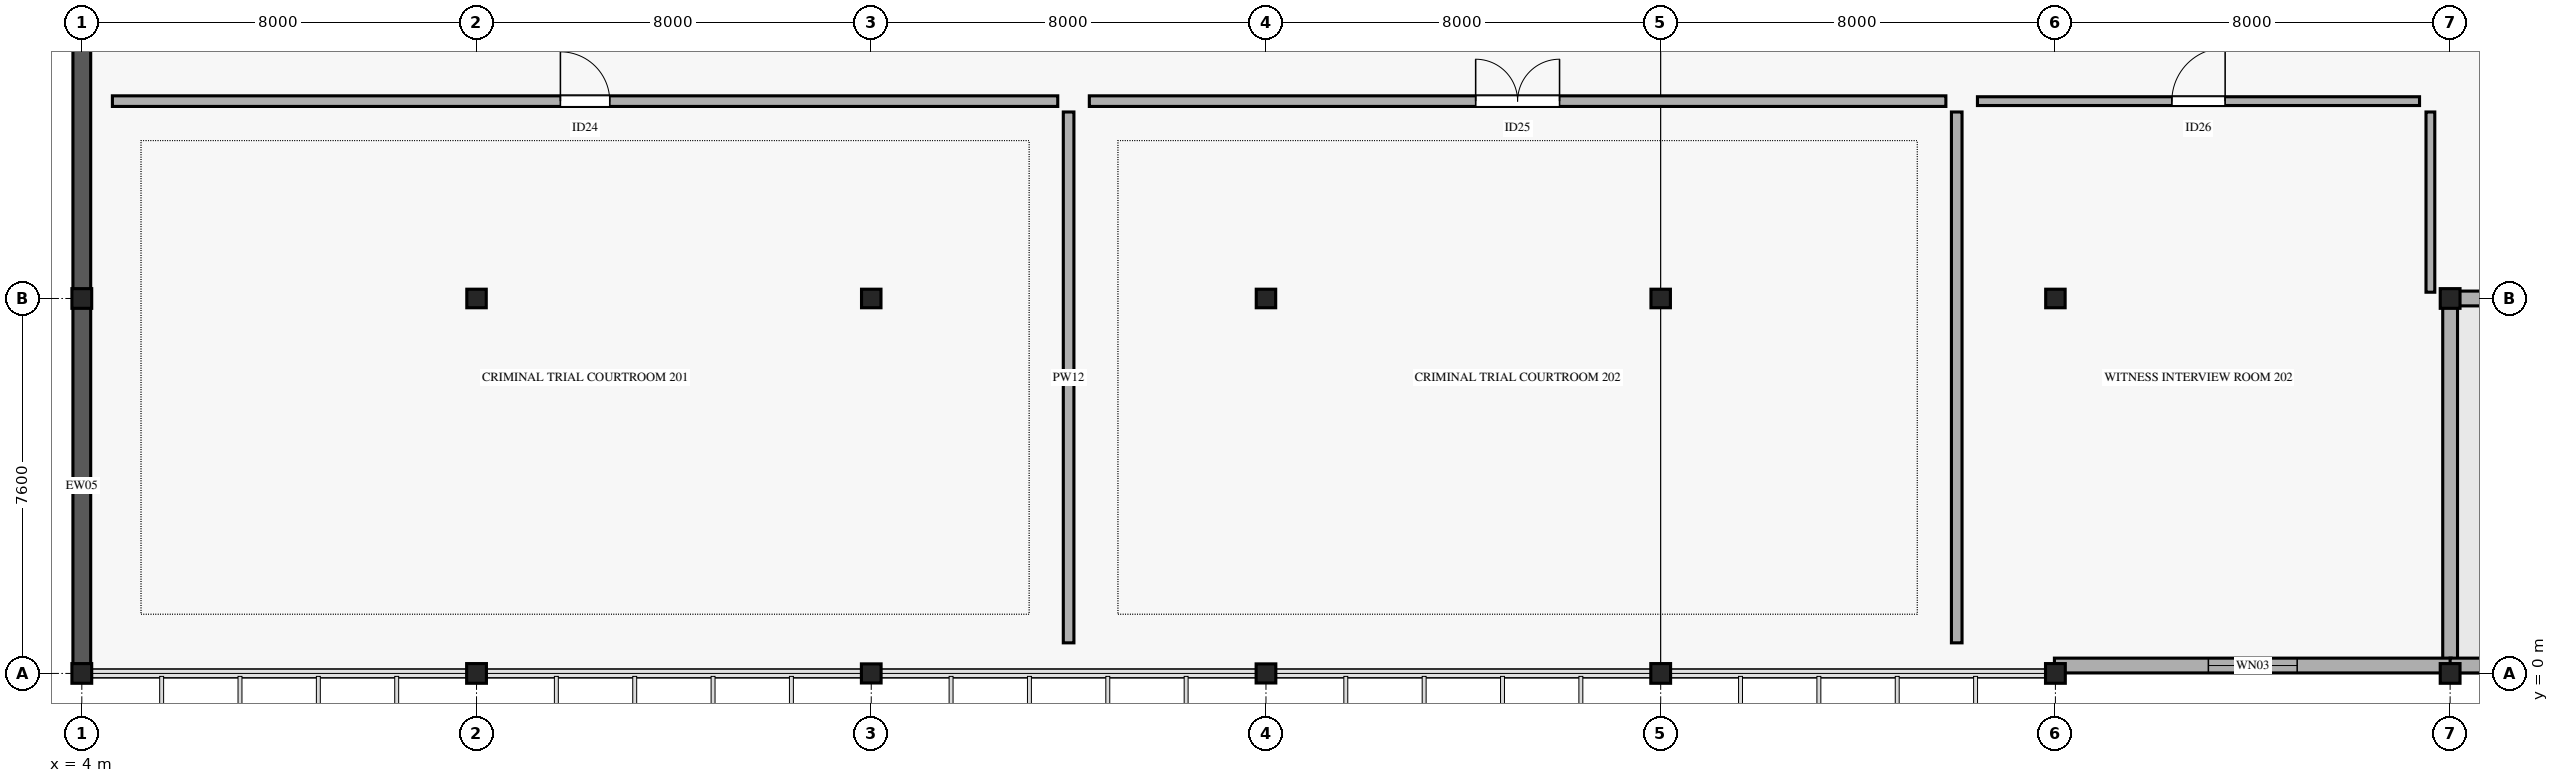
"""IFC4 building model, lengths in metres.
Left out: names, types, materials, properties, quantities, classifications, styles, units other than length and angle.
Written with IfcOpenShell. Run it as: python <this file> out.ifc"""

import sys

from ifc_helpers import new_model, si_unit, direction, frame, frame_2d, origin, origin_2d, place, context, subcontext, project, spatial, rectangle, i_section, extrude, element, fill, save


model = new_model("IFC4")
c1 = context("Model", 3, precision=1e-05, world=origin(), true_north=direction((0.0, 1.0)))
c2 = subcontext(c1, "Body", "Model", "MODEL_VIEW")
j1 = project(units=[si_unit("LENGTHUNIT", "METRE"), si_unit("PLANEANGLEUNIT", "RADIAN")], contexts=[c1])
p1 = place(None, origin())
s1 = spatial("IfcSite", under=j1, at=p1, CompositionType="ELEMENT")
p2 = place(p1, origin())
s2 = spatial("IfcBuilding", under=s1, at=p2, CompositionType="ELEMENT")
p3 = place(p2, frame((0.0, 0.0, 10.8)))
s3 = spatial("IfcBuildingStorey", under=s2, at=p3, CompositionType="ELEMENT", Elevation=10.8)
for number, where, z_axis, x_axis in (
    (1, (4.0, 0.0, 0.0), (0.0, 0.0, 1.0), (1.0, 0.0, 0.0)),
    (2, (4.0, 7.6, 0.0), (0.0, 0.0, 1.0), (1.0, 0.0, 0.0)),
    (3, (12.0, 0.0, 0.0), (0.0, 0.0, 1.0), (1.0, 0.0, 0.0)),
):
    element("IfcColumn", number, at=place(p3, frame(where, z_axis=z_axis, x_axis=x_axis)), inside=s3, PredefinedType="COLUMN", context=c2, shape_type="SweptSolid", body=[
        extrude(i_section(OverallWidth=0.401, OverallDepth=0.399, WebThickness=0.025, FlangeThickness=0.04, FilletRadius=0.015, at=origin_2d()), origin(), (0.0, 0.0, 1.0), 4.59),
    ])
p4 = place(p3, frame((12.0, 7.6, 0.0), z_axis=(0.0, 0.0, 1.0), x_axis=(1.0, 0.0, 0.0)))
e4 = element("IfcColumn", 4, at=p4, inside=s3, PredefinedType="COLUMN", context=c2, shape_type="SweptSolid", body=[
    extrude(i_section(OverallWidth=0.394, OverallDepth=0.376, WebThickness=0.017, FlangeThickness=0.028, FilletRadius=0.015, at=origin_2d()), origin(), (0.0, 0.0, 1.0), 4.59),
])
p5 = place(p3, frame((20.0, 0.0, 0.0), z_axis=(0.0, 0.0, 1.0), x_axis=(1.0, 0.0, 0.0)))
e5 = element("IfcColumn", 5, at=p5, inside=s3, PredefinedType="COLUMN", context=c2, shape_type="SweptSolid", body=[
    extrude(i_section(OverallWidth=0.399, OverallDepth=0.387, WebThickness=0.021, FlangeThickness=0.033, FilletRadius=0.015, at=origin_2d()), origin(), (0.0, 0.0, 1.0), 4.59),
])
p6 = place(p3, frame((20.0, 7.6, 0.0), z_axis=(0.0, 0.0, 1.0), x_axis=(1.0, 0.0, 0.0)))
e6 = element("IfcColumn", 6, at=p6, inside=s3, PredefinedType="COLUMN", context=c2, shape_type="SweptSolid", body=[
    extrude(i_section(OverallWidth=0.394, OverallDepth=0.376, WebThickness=0.017, FlangeThickness=0.028, FilletRadius=0.015, at=origin_2d()), origin(), (0.0, 0.0, 1.0), 4.59),
])
p7 = place(p3, frame((28.0, 0.0, 0.0), z_axis=(0.0, 0.0, 1.0), x_axis=(1.0, 0.0, 0.0)))
e7 = element("IfcColumn", 7, at=p7, inside=s3, PredefinedType="COLUMN", context=c2, shape_type="SweptSolid", body=[
    extrude(i_section(OverallWidth=0.399, OverallDepth=0.387, WebThickness=0.021, FlangeThickness=0.033, FilletRadius=0.015, at=origin_2d()), origin(), (0.0, 0.0, 1.0), 4.59),
])
p8 = place(p3, frame((28.0, 7.6, 0.0), z_axis=(0.0, 0.0, 1.0), x_axis=(1.0, 0.0, 0.0)))
e8 = element("IfcColumn", 8, at=p8, inside=s3, PredefinedType="COLUMN", context=c2, shape_type="SweptSolid", body=[
    extrude(i_section(OverallWidth=0.394, OverallDepth=0.376, WebThickness=0.017, FlangeThickness=0.028, FilletRadius=0.015, at=origin_2d()), origin(), (0.0, 0.0, 1.0), 4.59),
])
p9 = place(p3, frame((36.0, 0.0, 0.0), z_axis=(0.0, 0.0, 1.0), x_axis=(1.0, 0.0, 0.0)))
e9 = element("IfcColumn", 9, at=p9, inside=s3, PredefinedType="COLUMN", context=c2, shape_type="SweptSolid", body=[
    extrude(i_section(OverallWidth=0.401, OverallDepth=0.399, WebThickness=0.025, FlangeThickness=0.04, FilletRadius=0.015, at=origin_2d()), origin(), (0.0, 0.0, 1.0), 4.59),
])
p10 = place(p3, frame((36.0, 7.6, 0.0), z_axis=(0.0, 0.0, 1.0), x_axis=(1.0, 0.0, 0.0)))
e10 = element("IfcColumn", 10, at=p10, inside=s3, PredefinedType="COLUMN", context=c2, shape_type="SweptSolid", body=[
    extrude(i_section(OverallWidth=0.394, OverallDepth=0.376, WebThickness=0.017, FlangeThickness=0.028, FilletRadius=0.015, at=origin_2d()), origin(), (0.0, 0.0, 1.0), 4.59),
])
p11 = place(p3, frame((44.0, 0.0, 0.0), z_axis=(0.0, 0.0, 1.0), x_axis=(1.0, 0.0, 0.0)))
e11 = element("IfcColumn", 11, at=p11, inside=s3, PredefinedType="COLUMN", context=c2, shape_type="SweptSolid", body=[
    extrude(i_section(OverallWidth=0.401, OverallDepth=0.399, WebThickness=0.025, FlangeThickness=0.04, FilletRadius=0.015, at=origin_2d()), origin(), (0.0, 0.0, 1.0), 4.59),
])
p12 = place(p3, frame((44.0, 7.6, 0.0), z_axis=(0.0, 0.0, 1.0), x_axis=(1.0, 0.0, 0.0)))
e12 = element("IfcColumn", 12, at=p12, inside=s3, PredefinedType="COLUMN", context=c2, shape_type="SweptSolid", body=[
    extrude(i_section(OverallWidth=0.394, OverallDepth=0.376, WebThickness=0.017, FlangeThickness=0.028, FilletRadius=0.015, at=origin_2d()), origin(), (0.0, 0.0, 1.0), 4.59),
])
for number, where, z_axis, x_axis in (
    (13, (52.0, 0.0, 0.0), (0.0, 0.0, 1.0), (1.0, 0.0, 0.0)),
    (14, (52.0, 7.6, 0.0), (0.0, 0.0, 1.0), (1.0, 0.0, 0.0)),
):
    element("IfcColumn", number, at=place(p3, frame(where, z_axis=z_axis, x_axis=x_axis)), inside=s3, PredefinedType="COLUMN", context=c2, shape_type="SweptSolid", body=[
        extrude(i_section(OverallWidth=0.401, OverallDepth=0.399, WebThickness=0.025, FlangeThickness=0.04, FilletRadius=0.015, at=origin_2d()), origin(), (0.0, 0.0, 1.0), 4.59),
    ])
p13 = place(p3, frame((4.0, -0.02, 0.0), z_axis=(0.0, 0.0, 1.0), x_axis=(0.0, 1.0, 0.0)))
e15 = element("IfcWall", 15, at=p13, inside=s3, PredefinedType="STANDARD", context=c2, shape_type="SweptSolid", body=[
    extrude(rectangle(XDim=7.64, YDim=0.36, at=frame_2d((3.82, 0.0))), origin(), (0.0, 0.0, 1.0), 4.6),
])
p14 = place(p3, frame((4.0, 7.58, 0.0), z_axis=(0.0, 0.0, 1.0), x_axis=(0.0, 1.0, 0.0)))
e16 = element("IfcWall", 16, at=p14, inside=s3, PredefinedType="STANDARD", context=c2, shape_type="SweptSolid", body=[
    extrude(rectangle(XDim=7.64, YDim=0.36, at=frame_2d((3.82, 0.0))), origin(), (0.0, 0.0, 1.0), 4.6),
])
p15 = place(p3, frame((60.02, 7.6, 0.0), z_axis=(0.0, 0.0, 1.0), x_axis=(-1.0, 0.0, 0.0)))
e17 = element("IfcWall", 17, at=p15, inside=s3, PredefinedType="STANDARD", context=c2, shape_type="SweptSolid", body=[
    extrude(rectangle(XDim=8.04, YDim=0.3, at=frame_2d((4.02, 0.0))), origin(), (0.0, 0.0, 1.0), 3.46),
])
p16 = place(p3, frame((52.0, 7.62, 0.0), z_axis=(0.0, 0.0, 1.0), x_axis=(0.0, -1.0, 0.0)))
e18 = element("IfcWall", 18, at=p16, inside=s3, PredefinedType="STANDARD", context=c2, shape_type="SweptSolid", body=[
    extrude(rectangle(XDim=7.64, YDim=0.3, at=frame_2d((3.82, 0.0))), origin(), (0.0, 0.0, 1.0), 3.46),
])
p17 = place(p3, frame((52.02, 0.16, 0.0), z_axis=(0.0, 0.0, 1.0), x_axis=(-1.0, 0.0, 0.0)))
e19 = element("IfcWall", 19, at=p17, inside=s3, PredefinedType="STANDARD", context=c2, shape_type="SweptSolid", body=[
    extrude(rectangle(XDim=8.04, YDim=0.3, at=frame_2d((4.02, 0.0))), origin(), (0.0, 0.0, 1.0), 3.46),
])
p18 = place(p17, frame((3.12, 0.0, 0.75)))
e20 = element("IfcOpeningElement", 20, at=p18, cuts=e19, PredefinedType="OPENING", context=c2, shape_type="SweptSolid", body=[
    extrude(rectangle(XDim=1.8, YDim=2.0, at=frame_2d((0.9, 1.0))), frame((0.0, 0.16, 0.0), z_axis=(0.0, -1.0, 0.0), x_axis=(1.0, 0.0, 0.0)), (0.0, 0.0, 1.0), 0.32),
])
p19 = place(p3, frame((52.0, 0.16, 3.52), z_axis=(0.0, 0.0, 1.0), x_axis=(1.0, 0.0, 0.0)))
e21 = element("IfcWall", 21, at=p19, inside=s3, PredefinedType="STANDARD", context=c2, shape_type="SweptSolid", body=[
    extrude(rectangle(XDim=8.0, YDim=0.3, at=frame_2d((4.0, 0.0))), origin(), (0.0, 0.0, 1.0), 1.07),
])
p20 = place(p3, frame((4.62, 11.6, 0.0), z_axis=(0.0, 0.0, 1.0), x_axis=(1.0, 0.0, 0.0)))
e22 = element("IfcWall", 22, at=p20, inside=s3, PredefinedType="PARTITIONING", context=c2, shape_type="SweptSolid", body=[
    extrude(rectangle(XDim=19.16, YDim=0.215, at=frame_2d((9.58, 0.0))), origin(), (0.0, 0.0, 1.0), 3.45),
])
p21 = place(p20, frame((9.08, 0.0, 0.0)))
e23 = element("IfcOpeningElement", 23, at=p21, cuts=e22, PredefinedType="OPENING", context=c2, shape_type="SweptSolid", body=[
    extrude(rectangle(XDim=1.0, YDim=2.15, at=frame_2d((0.5, 1.075))), frame((0.0, 0.117, 0.0), z_axis=(0.0, -1.0, 0.0), x_axis=(1.0, 0.0, 0.0)), (0.0, 0.0, 1.0), 0.235),
])
p22 = place(p3, frame((24.0, 0.62, 0.0), z_axis=(0.0, 0.0, 1.0), x_axis=(0.0, 1.0, 0.0)))
e24 = element("IfcWall", 24, at=p22, inside=s3, PredefinedType="PARTITIONING", context=c2, shape_type="SweptSolid", body=[
    extrude(rectangle(XDim=10.76, YDim=0.215, at=frame_2d((5.38, 0.0))), origin(), (0.0, 0.0, 1.0), 3.45),
])
p23 = place(p3, frame((24.42, 11.6, 0.0), z_axis=(0.0, 0.0, 1.0), x_axis=(1.0, 0.0, 0.0)))
e25 = element("IfcWall", 25, at=p23, inside=s3, PredefinedType="PARTITIONING", context=c2, shape_type="SweptSolid", body=[
    extrude(rectangle(XDim=17.36, YDim=0.215, at=frame_2d((8.68, 0.0))), origin(), (0.0, 0.0, 1.0), 3.45),
])
p24 = place(p23, frame((7.83, 0.0, 0.0)))
e26 = element("IfcOpeningElement", 26, at=p24, cuts=e25, PredefinedType="OPENING", context=c2, shape_type="SweptSolid", body=[
    extrude(rectangle(XDim=1.7, YDim=2.3, at=frame_2d((0.85, 1.15))), frame((0.0, 0.117, 0.0), z_axis=(0.0, -1.0, 0.0), x_axis=(1.0, 0.0, 0.0)), (0.0, 0.0, 1.0), 0.235),
])
p25 = place(p3, frame((42.0, 0.62, 0.0), z_axis=(0.0, 0.0, 1.0), x_axis=(0.0, 1.0, 0.0)))
e27 = element("IfcWall", 27, at=p25, inside=s3, PredefinedType="PARTITIONING", context=c2, shape_type="SweptSolid", body=[
    extrude(rectangle(XDim=10.76, YDim=0.215, at=frame_2d((5.38, 0.0))), origin(), (0.0, 0.0, 1.0), 3.45),
])
p26 = place(p3, frame((42.42, 11.6, 0.0), z_axis=(0.0, 0.0, 1.0), x_axis=(1.0, 0.0, 0.0)))
e28 = element("IfcWall", 28, at=p26, inside=s3, PredefinedType="PARTITIONING", context=c2, shape_type="SweptSolid", body=[
    extrude(rectangle(XDim=8.96, YDim=0.178, at=frame_2d((4.48, 0.0))), origin(), (0.0, 0.0, 1.0), 3.45),
])
p27 = place(p26, frame((3.94, 0.0, 0.0)))
e29 = element("IfcOpeningElement", 29, at=p27, cuts=e28, PredefinedType="OPENING", context=c2, shape_type="SweptSolid", body=[
    extrude(rectangle(XDim=1.08, YDim=2.25, at=frame_2d((0.54, 1.125))), frame((0.0, 0.099, 0.0), z_axis=(0.0, -1.0, 0.0), x_axis=(1.0, 0.0, 0.0)), (0.0, 0.0, 1.0), 0.198),
])
p28 = place(p3, frame((51.6, 7.727, 0.0), z_axis=(0.0, 0.0, 1.0), x_axis=(0.0, 1.0, 0.0)))
e30 = element("IfcWall", 30, at=p28, inside=s3, PredefinedType="PARTITIONING", context=c2, shape_type="SweptSolid", body=[
    extrude(rectangle(XDim=3.653, YDim=0.178, at=frame_2d((1.826, 0.0))), origin(), (0.0, 0.0, 1.0), 3.45),
])
p29 = place(p18, origin())
e31 = element("IfcWindow", 31, at=p29, inside=s3, PartitioningType="SINGLE_PANEL", PredefinedType="WINDOW", context=c2, shape_type="SweptSolid", body=[
    extrude(rectangle(XDim=1.8, YDim=2.0, at=frame_2d((0.9, 1.0))), frame((0.0, 0.03, 0.0), z_axis=(0.0, -1.0, 0.0), x_axis=(1.0, 0.0, 0.0)), (0.0, 0.0, 1.0), 0.06),
])
fill(e20, e31)
p30 = place(p21, origin())
e32 = element("IfcDoor", 32, at=p30, inside=s3, OperationType="SINGLE_SWING_LEFT", PredefinedType="DOOR", context=c2, shape_type="SweptSolid", body=[
    extrude(rectangle(XDim=1.0, YDim=2.15, at=frame_2d((0.5, 1.075))), frame((0.0, 0.025, 0.0), z_axis=(0.0, -1.0, 0.0), x_axis=(1.0, 0.0, 0.0)), (0.0, 0.0, 1.0), 0.05),
])
fill(e23, e32)
p31 = place(p24, origin())
e33 = element("IfcDoor", 33, at=p31, inside=s3, OperationType="DOUBLE_DOOR_SINGLE_SWING", PredefinedType="DOOR", context=c2, shape_type="SweptSolid", body=[
    extrude(rectangle(XDim=1.7, YDim=2.3, at=frame_2d((0.85, 1.15))), frame((0.0, 0.025, 0.0), z_axis=(0.0, -1.0, 0.0), x_axis=(1.0, 0.0, 0.0)), (0.0, 0.0, 1.0), 0.05),
])
fill(e26, e33)
p32 = place(p27, origin())
e34 = element("IfcDoor", 34, at=p32, inside=s3, OperationType="SINGLE_SWING_RIGHT", PredefinedType="DOOR", context=c2, shape_type="SweptSolid", body=[
    extrude(rectangle(XDim=1.08, YDim=2.25, at=frame_2d((0.54, 1.125))), frame((0.0, 0.025, 0.0), z_axis=(0.0, -1.0, 0.0), x_axis=(1.0, 0.0, 0.0)), (0.0, 0.0, 1.0), 0.05),
])
fill(e29, e34)
save(model, sys.argv[1])
